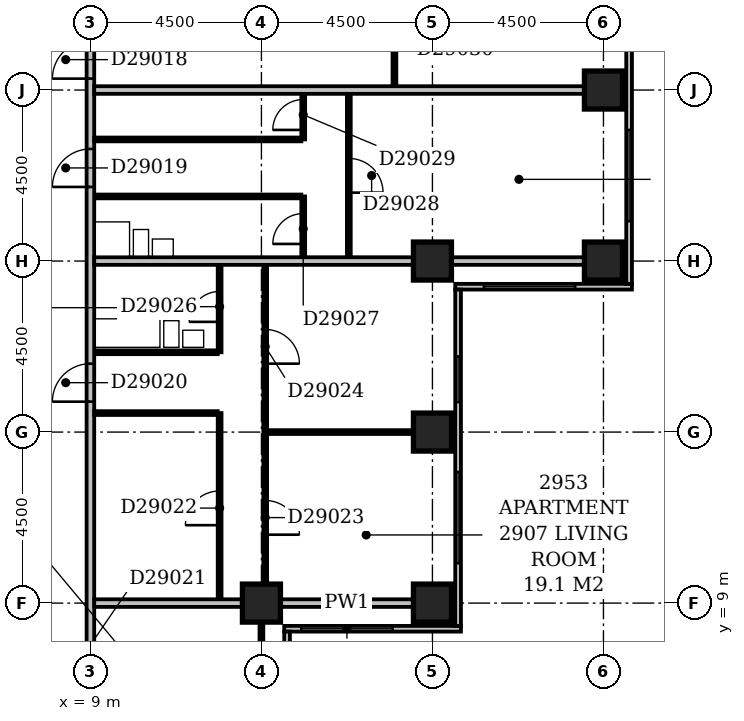
"""IFC4 building model, lengths in metres.
Left out: names, types, materials, properties, quantities, classifications, styles, units other than length and angle.
Written with IfcOpenShell. Run it as: python <this file> out.ifc"""

import sys

from ifc_helpers import new_model, si_unit, direction, frame, frame_2d, origin, origin_2d, place, context, subcontext, project, spatial, rectangle, extrude, element, fill, save


model = new_model("IFC4")
c1 = context("Model", 3, precision=1e-05, world=origin(), true_north=direction((0.0, 1.0)))
c2 = subcontext(c1, "Body", "Model", "MODEL_VIEW")
j1 = project(units=[si_unit("LENGTHUNIT", "METRE"), si_unit("PLANEANGLEUNIT", "RADIAN")], contexts=[c1])
p1 = place(None, origin())
s1 = spatial("IfcSite", under=j1, at=p1, CompositionType="ELEMENT")
p2 = place(p1, origin())
s2 = spatial("IfcBuilding", under=s1, at=p2, CompositionType="ELEMENT")
p3 = place(p2, frame((0.0, 0.0, 119.6)))
s3 = spatial("IfcBuildingStorey", under=s2, at=p3, CompositionType="ELEMENT", Elevation=119.6)
for number, where, z_axis, x_axis in (
    (1, (13.5, 9.0, -0.3), (0.0, 0.0, 1.0), (1.0, 0.0, 0.0)),
    (2, (18.0, 9.0, -0.3), (0.0, 0.0, 1.0), (1.0, 0.0, 0.0)),
    (3, (18.0, 13.5, -0.3), (0.0, 0.0, 1.0), (1.0, 0.0, 0.0)),
    (4, (18.0, 18.0, -0.3), (0.0, 0.0, 1.0), (1.0, 0.0, 0.0)),
    (5, (22.5, 18.0, -0.3), (0.0, 0.0, 1.0), (1.0, 0.0, 0.0)),
    (6, (22.5, 22.5, -0.3), (0.0, 0.0, 1.0), (1.0, 0.0, 0.0)),
):
    element("IfcColumn", number, at=place(p3, frame(where, z_axis=z_axis, x_axis=x_axis)), inside=s3, PredefinedType="COLUMN", context=c2, shape_type="SweptSolid", body=[
        extrude(rectangle(XDim=1.0, YDim=1.0, at=origin_2d()), origin(), (0.0, 0.0, 1.0), 3.6),
    ])
p4 = place(p3, frame((14.175, 3.9, 0.0), z_axis=(0.0, 0.0, 1.0), x_axis=(0.0, 1.0, 0.0)))
e7 = element("IfcWall", 7, at=p4, inside=s3, PredefinedType="STANDARD", context=c2, shape_type="SweptSolid", body=[
    extrude(rectangle(XDim=4.35, YDim=0.15, at=frame_2d((2.175, 0.0))), origin(), (0.0, 0.0, 1.0), 2.7),
])
p5 = place(p4, frame((1.65, 0.0, 0.6)))
e8 = element("IfcOpeningElement", 8, at=p5, cuts=e7, PredefinedType="OPENING", context=c2, shape_type="SweptSolid", body=[
    extrude(rectangle(XDim=2.4, YDim=1.8, at=frame_2d((1.2, 0.9))), frame((0.0, 0.087, 0.0), z_axis=(0.0, -1.0, 0.0), x_axis=(1.0, 0.0, 0.0)), (0.0, 0.0, 1.0), 0.174),
])
p6 = place(p3, frame((14.1, 8.325, 0.0), z_axis=(0.0, 0.0, 1.0), x_axis=(1.0, 0.0, 0.0)))
e9 = element("IfcWall", 9, at=p6, inside=s3, PredefinedType="STANDARD", context=c2, shape_type="SweptSolid", body=[
    extrude(rectangle(XDim=4.65, YDim=0.15, at=frame_2d((2.325, 0.0))), origin(), (0.0, 0.0, 1.0), 2.7),
])
p7 = place(p6, frame((0.45, 0.0, 0.6)))
e10 = element("IfcOpeningElement", 10, at=p7, cuts=e9, PredefinedType="OPENING", context=c2, shape_type="SweptSolid", body=[
    extrude(rectangle(XDim=2.4, YDim=1.8, at=frame_2d((1.2, 0.9))), frame((0.0, 0.087, 0.0), z_axis=(0.0, -1.0, 0.0), x_axis=(1.0, 0.0, 0.0)), (0.0, 0.0, 1.0), 0.174),
])
p8 = place(p3, frame((18.675, 8.4, 0.0), z_axis=(0.0, 0.0, 1.0), x_axis=(0.0, 1.0, 0.0)))
e11 = element("IfcWall", 11, at=p8, inside=s3, PredefinedType="STANDARD", context=c2, shape_type="SweptSolid", body=[
    extrude(rectangle(XDim=8.85, YDim=0.15, at=frame_2d((4.425, 0.0))), origin(), (0.0, 0.0, 1.0), 2.7),
])
p9 = place(p8, frame((1.65, 0.0, 0.6)))
e12 = element("IfcOpeningElement", 12, at=p9, cuts=e11, PredefinedType="OPENING", context=c2, shape_type="SweptSolid", body=[
    extrude(rectangle(XDim=2.4, YDim=1.8, at=frame_2d((1.2, 0.9))), frame((0.0, 0.087, 0.0), z_axis=(0.0, -1.0, 0.0), x_axis=(1.0, 0.0, 0.0)), (0.0, 0.0, 1.0), 0.174),
])
p10 = place(p8, frame((5.889, 0.0, 0.6)))
e13 = element("IfcOpeningElement", 13, at=p10, cuts=e11, PredefinedType="OPENING", context=c2, shape_type="SweptSolid", body=[
    extrude(rectangle(XDim=1.2, YDim=1.8, at=frame_2d((0.6, 0.9))), frame((0.0, 0.087, 0.0), z_axis=(0.0, -1.0, 0.0), x_axis=(1.0, 0.0, 0.0)), (0.0, 0.0, 1.0), 0.174),
])
p11 = place(p3, frame((18.6, 17.325, 0.0), z_axis=(0.0, 0.0, 1.0), x_axis=(1.0, 0.0, 0.0)))
e14 = element("IfcWall", 14, at=p11, inside=s3, PredefinedType="STANDARD", context=c2, shape_type="SweptSolid", body=[
    extrude(rectangle(XDim=4.65, YDim=0.15, at=frame_2d((2.325, 0.0))), origin(), (0.0, 0.0, 1.0), 2.7),
])
p12 = place(p11, frame((0.757, 0.0, 0.6)))
e15 = element("IfcOpeningElement", 15, at=p12, cuts=e14, PredefinedType="OPENING", context=c2, shape_type="SweptSolid", body=[
    extrude(rectangle(XDim=2.4, YDim=1.8, at=frame_2d((1.2, 0.9))), frame((0.0, 0.087, 0.0), z_axis=(0.0, -1.0, 0.0), x_axis=(1.0, 0.0, 0.0)), (0.0, 0.0, 1.0), 0.174),
])
p13 = place(p3, frame((23.175, 17.4, 0.0), z_axis=(0.0, 0.0, 1.0), x_axis=(0.0, 1.0, 0.0)))
e16 = element("IfcWall", 16, at=p13, inside=s3, PredefinedType="STANDARD", context=c2, shape_type="SweptSolid", body=[
    extrude(rectangle(XDim=17.85, YDim=0.15, at=frame_2d((8.925, 0.0))), origin(), (0.0, 0.0, 1.0), 2.7),
])
p14 = place(p13, frame((1.65, 0.0, 0.6)))
e17 = element("IfcOpeningElement", 17, at=p14, cuts=e16, PredefinedType="OPENING", context=c2, shape_type="SweptSolid", body=[
    extrude(rectangle(XDim=2.4, YDim=1.8, at=frame_2d((1.2, 0.9))), frame((0.0, 0.087, 0.0), z_axis=(0.0, -1.0, 0.0), x_axis=(1.0, 0.0, 0.0)), (0.0, 0.0, 1.0), 0.174),
])
p15 = place(p13, frame((6.15, 0.0, 0.6)))
e18 = element("IfcOpeningElement", 18, at=p15, cuts=e16, PredefinedType="OPENING", context=c2, shape_type="SweptSolid", body=[
    extrude(rectangle(XDim=2.4, YDim=1.8, at=frame_2d((1.2, 0.9))), frame((0.0, 0.087, 0.0), z_axis=(0.0, -1.0, 0.0), x_axis=(1.0, 0.0, 0.0)), (0.0, 0.0, 1.0), 0.174),
])
p16 = place(p13, frame((10.65, 0.0, 0.6)))
e19 = element("IfcOpeningElement", 19, at=p16, cuts=e16, PredefinedType="OPENING", context=c2, shape_type="SweptSolid", body=[
    extrude(rectangle(XDim=2.4, YDim=1.8, at=frame_2d((1.2, 0.9))), frame((0.0, 0.087, 0.0), z_axis=(0.0, -1.0, 0.0), x_axis=(1.0, 0.0, 0.0)), (0.0, 0.0, 1.0), 0.174),
])
p17 = place(p13, frame((17.13, 0.0, 0.6)))
e20 = element("IfcOpeningElement", 20, at=p17, cuts=e16, PredefinedType="OPENING", context=c2, shape_type="SweptSolid", body=[
    extrude(rectangle(XDim=0.45, YDim=1.8, at=frame_2d((0.225, 0.9))), frame((0.0, 0.087, 0.0), z_axis=(0.0, -1.0, 0.0), x_axis=(1.0, 0.0, 0.0)), (0.0, 0.0, 1.0), 0.174),
])
p18 = place(p3, frame((9.0, 5.0, 0.0), z_axis=(0.0, 0.0, 1.0), x_axis=(0.0, 1.0, 0.0)))
e21 = element("IfcWall", 21, at=p18, inside=s3, PredefinedType="PARTITIONING", context=c2, shape_type="SweptSolid", body=[
    extrude(rectangle(XDim=27.75, YDim=0.2, at=frame_2d((13.875, 0.0))), origin(), (0.0, 0.0, 1.0), 3.3),
])
p19 = place(p18, frame((17.8, 0.0, 0.0)))
e22 = element("IfcOpeningElement", 22, at=p19, cuts=e21, PredefinedType="OPENING", context=c2, shape_type="SweptSolid", body=[
    extrude(rectangle(XDim=1.0, YDim=2.1, at=frame_2d((0.5, 1.05))), frame((0.0, 0.112, 0.0), z_axis=(0.0, -1.0, 0.0), x_axis=(1.0, 0.0, 0.0)), (0.0, 0.0, 1.0), 0.224),
])
p20 = place(p18, frame((14.95, 0.0, 0.0)))
e23 = element("IfcOpeningElement", 23, at=p20, cuts=e21, PredefinedType="OPENING", context=c2, shape_type="SweptSolid", body=[
    extrude(rectangle(XDim=1.0, YDim=2.1, at=frame_2d((0.5, 1.05))), frame((0.0, 0.112, 0.0), z_axis=(0.0, -1.0, 0.0), x_axis=(1.0, 0.0, 0.0)), (0.0, 0.0, 1.0), 0.224),
])
p21 = place(p18, frame((9.3, 0.0, 0.0)))
e24 = element("IfcOpeningElement", 24, at=p21, cuts=e21, PredefinedType="OPENING", context=c2, shape_type="SweptSolid", body=[
    extrude(rectangle(XDim=1.0, YDim=2.1, at=frame_2d((0.5, 1.05))), frame((0.0, 0.112, 0.0), z_axis=(0.0, -1.0, 0.0), x_axis=(1.0, 0.0, 0.0)), (0.0, 0.0, 1.0), 0.224),
])
p22 = place(p18, frame((1.5, 0.0, 0.0)))
e25 = element("IfcOpeningElement", 25, at=p22, cuts=e21, PredefinedType="OPENING", context=c2, shape_type="SweptSolid", body=[
    extrude(rectangle(XDim=0.9, YDim=2.1, at=frame_2d((0.45, 1.05))), frame((0.0, 0.112, 0.0), z_axis=(0.0, -1.0, 0.0), x_axis=(1.0, 0.0, 0.0)), (0.0, 0.0, 1.0), 0.224),
])
p23 = place(p3, frame((13.5, 5.0, 0.0), z_axis=(0.0, 0.0, 1.0), x_axis=(0.0, 1.0, 0.0)))
e26 = element("IfcWall", 26, at=p23, inside=s3, PredefinedType="PARTITIONING", context=c2, shape_type="SweptSolid", body=[
    extrude(rectangle(XDim=3.5, YDim=0.1, at=frame_2d((1.75, 0.0))), origin(), (0.0, 0.0, 1.0), 2.7),
])
p24 = place(p3, frame((9.1, 9.0, 0.0), z_axis=(0.0, 0.0, 1.0), x_axis=(1.0, 0.0, 0.0)))
e27 = element("IfcWall", 27, at=p24, inside=s3, PredefinedType="PARTITIONING", context=c2, shape_type="SweptSolid", body=[
    extrude(rectangle(XDim=3.9, YDim=0.2, at=frame_2d((1.95, 0.0))), origin(), (0.0, 0.0, 1.0), 3.3),
])
p25 = place(p3, frame((14.0, 9.0, 0.0), z_axis=(0.0, 0.0, 1.0), x_axis=(1.0, 0.0, 0.0)))
e28 = element("IfcWall", 28, at=p25, inside=s3, PredefinedType="PARTITIONING", context=c2, shape_type="SweptSolid", body=[
    extrude(rectangle(XDim=3.5, YDim=0.2, at=frame_2d((1.75, 0.0))), origin(), (0.0, 0.0, 1.0), 2.7),
])
p26 = place(p3, frame((12.4, 9.1, 0.0), z_axis=(0.0, 0.0, 1.0), x_axis=(0.0, 1.0, 0.0)))
e29 = element("IfcWall", 29, at=p26, inside=s3, PredefinedType="PARTITIONING", context=c2, shape_type="SweptSolid", body=[
    extrude(rectangle(XDim=4.9, YDim=0.1, at=frame_2d((2.45, 0.0))), origin(), (0.0, 0.0, 1.0), 3.3),
])
p27 = place(p26, frame((1.95, 0.0, 0.0)))
e30 = element("IfcOpeningElement", 30, at=p27, cuts=e29, PredefinedType="OPENING", context=c2, shape_type="SweptSolid", body=[
    extrude(rectangle(XDim=0.9, YDim=2.1, at=frame_2d((0.45, 1.05))), frame((0.0, 0.062, 0.0), z_axis=(0.0, -1.0, 0.0), x_axis=(1.0, 0.0, 0.0)), (0.0, 0.0, 1.0), 0.124),
])
p28 = place(p3, frame((13.6, 9.5, 0.0), z_axis=(0.0, 0.0, 1.0), x_axis=(0.0, 1.0, 0.0)))
e31 = element("IfcWall", 31, at=p28, inside=s3, PredefinedType="PARTITIONING", context=c2, shape_type="SweptSolid", body=[
    extrude(rectangle(XDim=8.4, YDim=0.1, at=frame_2d((4.2, 0.0))), origin(), (0.0, 0.0, 1.0), 3.3),
])
p29 = place(p28, frame((1.3, 0.0, 0.0)))
e32 = element("IfcOpeningElement", 32, at=p29, cuts=e31, PredefinedType="OPENING", context=c2, shape_type="SweptSolid", body=[
    extrude(rectangle(XDim=0.9, YDim=2.1, at=frame_2d((0.45, 1.05))), frame((0.0, 0.062, 0.0), z_axis=(0.0, -1.0, 0.0), x_axis=(1.0, 0.0, 0.0)), (0.0, 0.0, 1.0), 0.124),
])
p30 = place(p28, frame((5.8, 0.0, 0.0)))
e33 = element("IfcOpeningElement", 33, at=p30, cuts=e31, PredefinedType="OPENING", context=c2, shape_type="SweptSolid", body=[
    extrude(rectangle(XDim=0.9, YDim=2.1, at=frame_2d((0.45, 1.05))), frame((0.0, 0.062, 0.0), z_axis=(0.0, -1.0, 0.0), x_axis=(1.0, 0.0, 0.0)), (0.0, 0.0, 1.0), 0.124),
])
p31 = place(p3, frame((13.65, 13.5, 0.0), z_axis=(0.0, 0.0, 1.0), x_axis=(1.0, 0.0, 0.0)))
e34 = element("IfcWall", 34, at=p31, inside=s3, PredefinedType="PARTITIONING", context=c2, shape_type="SweptSolid", body=[
    extrude(rectangle(XDim=3.85, YDim=0.1, at=frame_2d((1.925, 0.0))), origin(), (0.0, 0.0, 1.0), 3.3),
])
p32 = place(p3, frame((9.1, 14.0, 0.0), z_axis=(0.0, 0.0, 1.0), x_axis=(1.0, 0.0, 0.0)))
e35 = element("IfcWall", 35, at=p32, inside=s3, PredefinedType="PARTITIONING", context=c2, shape_type="SweptSolid", body=[
    extrude(rectangle(XDim=3.25, YDim=0.1, at=frame_2d((1.625, 0.0))), origin(), (0.0, 0.0, 1.0), 3.3),
])
p33 = place(p3, frame((9.1, 15.6, 0.0), z_axis=(0.0, 0.0, 1.0), x_axis=(1.0, 0.0, 0.0)))
e36 = element("IfcWall", 36, at=p33, inside=s3, PredefinedType="PLUMBINGWALL", context=c2, shape_type="SweptSolid", body=[
    extrude(rectangle(XDim=3.25, YDim=0.1, at=frame_2d((1.625, 0.0))), origin(), (0.0, 0.0, 1.0), 3.3),
])
p34 = place(p3, frame((12.4, 15.6, 0.0), z_axis=(0.0, 0.0, 1.0), x_axis=(0.0, 1.0, 0.0)))
e37 = element("IfcWall", 37, at=p34, inside=s3, PredefinedType="PARTITIONING", context=c2, shape_type="SweptSolid", body=[
    extrude(rectangle(XDim=2.3, YDim=0.1, at=frame_2d((1.15, 0.0))), origin(), (0.0, 0.0, 1.0), 3.3),
])
p35 = place(p34, frame((0.8, 0.0, 0.0)))
e38 = element("IfcOpeningElement", 38, at=p35, cuts=e37, PredefinedType="OPENING", context=c2, shape_type="SweptSolid", body=[
    extrude(rectangle(XDim=0.8, YDim=2.1, at=frame_2d((0.4, 1.05))), frame((0.0, 0.062, 0.0), z_axis=(0.0, -1.0, 0.0), x_axis=(1.0, 0.0, 0.0)), (0.0, 0.0, 1.0), 0.124),
])
p36 = place(p3, frame((9.1, 18.0, 0.0), z_axis=(0.0, 0.0, 1.0), x_axis=(1.0, 0.0, 0.0)))
e39 = element("IfcWall", 39, at=p36, inside=s3, PredefinedType="PARTITIONING", context=c2, shape_type="SweptSolid", body=[
    extrude(rectangle(XDim=8.4, YDim=0.2, at=frame_2d((4.2, 0.0))), origin(), (0.0, 0.0, 1.0), 2.6),
])
p37 = place(p3, frame((18.5, 18.0, 0.0), z_axis=(0.0, 0.0, 1.0), x_axis=(1.0, 0.0, 0.0)))
e40 = element("IfcWall", 40, at=p37, inside=s3, PredefinedType="PARTITIONING", context=c2, shape_type="SweptSolid", body=[
    extrude(rectangle(XDim=3.5, YDim=0.2, at=frame_2d((1.75, 0.0))), origin(), (0.0, 0.0, 1.0), 2.7),
])
p38 = place(p3, frame((14.6, 18.1, 0.0), z_axis=(0.0, 0.0, 1.0), x_axis=(0.0, 1.0, 0.0)))
e41 = element("IfcWall", 41, at=p38, inside=s3, PredefinedType="PARTITIONING", context=c2, shape_type="SweptSolid", body=[
    extrude(rectangle(XDim=1.6, YDim=0.1, at=frame_2d((0.8, 0.0))), origin(), (0.0, 0.0, 1.0), 3.3),
])
p39 = place(p38, frame((0.35, 0.0, 0.0)))
e42 = element("IfcOpeningElement", 42, at=p39, cuts=e41, PredefinedType="OPENING", context=c2, shape_type="SweptSolid", body=[
    extrude(rectangle(XDim=0.8, YDim=2.1, at=frame_2d((0.4, 1.05))), frame((0.0, 0.062, 0.0), z_axis=(0.0, -1.0, 0.0), x_axis=(1.0, 0.0, 0.0)), (0.0, 0.0, 1.0), 0.124),
])
p40 = place(p3, frame((15.8, 18.1, 0.0), z_axis=(0.0, 0.0, 1.0), x_axis=(0.0, 1.0, 0.0)))
e43 = element("IfcWall", 43, at=p40, inside=s3, PredefinedType="PARTITIONING", context=c2, shape_type="SweptSolid", body=[
    extrude(rectangle(XDim=4.3, YDim=0.1, at=frame_2d((2.15, 0.0))), origin(), (0.0, 0.0, 1.0), 3.3),
])
p41 = place(p40, frame((1.7, 0.0, 0.0)))
e44 = element("IfcOpeningElement", 44, at=p41, cuts=e43, PredefinedType="OPENING", context=c2, shape_type="SweptSolid", body=[
    extrude(rectangle(XDim=0.9, YDim=2.1, at=frame_2d((0.45, 1.05))), frame((0.0, 0.062, 0.0), z_axis=(0.0, -1.0, 0.0), x_axis=(1.0, 0.0, 0.0)), (0.0, 0.0, 1.0), 0.124),
])
p42 = place(p3, frame((9.1, 19.7, 0.0), z_axis=(0.0, 0.0, 1.0), x_axis=(1.0, 0.0, 0.0)))
e45 = element("IfcWall", 45, at=p42, inside=s3, PredefinedType="PLUMBINGWALL", context=c2, shape_type="SweptSolid", body=[
    extrude(rectangle(XDim=5.45, YDim=0.1, at=frame_2d((2.725, 0.0))), origin(), (0.0, 0.0, 1.0), 3.3),
])
p43 = place(p3, frame((9.1, 21.2, 0.0), z_axis=(0.0, 0.0, 1.0), x_axis=(1.0, 0.0, 0.0)))
e46 = element("IfcWall", 46, at=p43, inside=s3, PredefinedType="PARTITIONING", context=c2, shape_type="SweptSolid", body=[
    extrude(rectangle(XDim=5.45, YDim=0.1, at=frame_2d((2.725, 0.0))), origin(), (0.0, 0.0, 1.0), 3.3),
])
p44 = place(p3, frame((14.6, 21.2, 0.0), z_axis=(0.0, 0.0, 1.0), x_axis=(0.0, 1.0, 0.0)))
e47 = element("IfcWall", 47, at=p44, inside=s3, PredefinedType="PARTITIONING", context=c2, shape_type="SweptSolid", body=[
    extrude(rectangle(XDim=1.2, YDim=0.1, at=frame_2d((0.6, 0.0))), origin(), (0.0, 0.0, 1.0), 3.3),
])
p45 = place(p44, frame((0.25, 0.0, 0.0)))
e48 = element("IfcOpeningElement", 48, at=p45, cuts=e47, PredefinedType="OPENING", context=c2, shape_type="SweptSolid", body=[
    extrude(rectangle(XDim=0.8, YDim=2.1, at=frame_2d((0.4, 1.05))), frame((0.0, 0.062, 0.0), z_axis=(0.0, -1.0, 0.0), x_axis=(1.0, 0.0, 0.0)), (0.0, 0.0, 1.0), 0.124),
])
p46 = place(p3, frame((9.1, 22.5, 0.0), z_axis=(0.0, 0.0, 1.0), x_axis=(1.0, 0.0, 0.0)))
e49 = element("IfcWall", 49, at=p46, inside=s3, PredefinedType="PARTITIONING", context=c2, shape_type="SweptSolid", body=[
    extrude(rectangle(XDim=12.9, YDim=0.2, at=frame_2d((6.45, 0.0))), origin(), (0.0, 0.0, 1.0), 3.3),
])
p47 = place(p3, frame((17.0, 22.6, 0.0), z_axis=(0.0, 0.0, 1.0), x_axis=(0.0, 1.0, 0.0)))
e50 = element("IfcWall", 50, at=p47, inside=s3, PredefinedType="PARTITIONING", context=c2, shape_type="SweptSolid", body=[
    extrude(rectangle(XDim=8.8, YDim=0.1, at=frame_2d((4.4, 0.0))), origin(), (0.0, 0.0, 1.0), 3.3),
])
p48 = place(p47, frame((1.7, 0.0, 0.0)))
e51 = element("IfcOpeningElement", 51, at=p48, cuts=e50, PredefinedType="OPENING", context=c2, shape_type="SweptSolid", body=[
    extrude(rectangle(XDim=0.9, YDim=2.1, at=frame_2d((0.45, 1.05))), frame((0.0, 0.062, 0.0), z_axis=(0.0, -1.0, 0.0), x_axis=(1.0, 0.0, 0.0)), (0.0, 0.0, 1.0), 0.124),
])
p49 = place(p47, frame((6.2, 0.0, 0.0)))
e52 = element("IfcOpeningElement", 52, at=p49, cuts=e50, PredefinedType="OPENING", context=c2, shape_type="SweptSolid", body=[
    extrude(rectangle(XDim=0.9, YDim=2.1, at=frame_2d((0.45, 1.05))), frame((0.0, 0.062, 0.0), z_axis=(0.0, -1.0, 0.0), x_axis=(1.0, 0.0, 0.0)), (0.0, 0.0, 1.0), 0.124),
])
p50 = place(p7, origin())
e53 = element("IfcWindow", 53, at=p50, inside=s3, PartitioningType="SINGLE_PANEL", PredefinedType="WINDOW", context=c2, shape_type="SweptSolid", body=[
    extrude(rectangle(XDim=2.4, YDim=1.8, at=frame_2d((1.2, 0.9))), frame((0.0, 0.03, 0.0), z_axis=(0.0, -1.0, 0.0), x_axis=(1.0, 0.0, 0.0)), (0.0, 0.0, 1.0), 0.06),
])
fill(e10, e53)
p51 = place(p9, origin())
e54 = element("IfcWindow", 54, at=p51, inside=s3, PartitioningType="SINGLE_PANEL", PredefinedType="WINDOW", context=c2, shape_type="SweptSolid", body=[
    extrude(rectangle(XDim=2.4, YDim=1.8, at=frame_2d((1.2, 0.9))), frame((0.0, 0.03, 0.0), z_axis=(0.0, -1.0, 0.0), x_axis=(1.0, 0.0, 0.0)), (0.0, 0.0, 1.0), 0.06),
])
fill(e12, e54)
p52 = place(p10, origin())
e55 = element("IfcWindow", 55, at=p52, inside=s3, PartitioningType="SINGLE_PANEL", PredefinedType="WINDOW", context=c2, shape_type="SweptSolid", body=[
    extrude(rectangle(XDim=1.2, YDim=1.8, at=frame_2d((0.6, 0.9))), frame((0.0, 0.03, 0.0), z_axis=(0.0, -1.0, 0.0), x_axis=(1.0, 0.0, 0.0)), (0.0, 0.0, 1.0), 0.06),
])
fill(e13, e55)
p53 = place(p12, origin())
e56 = element("IfcWindow", 56, at=p53, inside=s3, PartitioningType="SINGLE_PANEL", PredefinedType="WINDOW", context=c2, shape_type="SweptSolid", body=[
    extrude(rectangle(XDim=2.4, YDim=1.8, at=frame_2d((1.2, 0.9))), frame((0.0, 0.03, 0.0), z_axis=(0.0, -1.0, 0.0), x_axis=(1.0, 0.0, 0.0)), (0.0, 0.0, 1.0), 0.06),
])
fill(e15, e56)
p54 = place(p14, origin())
e57 = element("IfcWindow", 57, at=p54, inside=s3, PartitioningType="SINGLE_PANEL", PredefinedType="WINDOW", context=c2, shape_type="SweptSolid", body=[
    extrude(rectangle(XDim=2.4, YDim=1.8, at=frame_2d((1.2, 0.9))), frame((0.0, 0.03, 0.0), z_axis=(0.0, -1.0, 0.0), x_axis=(1.0, 0.0, 0.0)), (0.0, 0.0, 1.0), 0.06),
])
fill(e17, e57)
p55 = place(p19, origin())
e58 = element("IfcDoor", 58, at=p55, inside=s3, OperationType="SINGLE_SWING_LEFT", PredefinedType="DOOR", context=c2, shape_type="SweptSolid", body=[
    extrude(rectangle(XDim=1.0, YDim=2.1, at=frame_2d((0.5, 1.05))), frame((0.0, 0.025, 0.0), z_axis=(0.0, -1.0, 0.0), x_axis=(1.0, 0.0, 0.0)), (0.0, 0.0, 1.0), 0.05),
])
fill(e22, e58)
p56 = place(p20, origin())
e59 = element("IfcDoor", 59, at=p56, inside=s3, OperationType="SINGLE_SWING_LEFT", PredefinedType="DOOR", context=c2, shape_type="SweptSolid", body=[
    extrude(rectangle(XDim=1.0, YDim=2.1, at=frame_2d((0.5, 1.05))), frame((0.0, 0.025, 0.0), z_axis=(0.0, -1.0, 0.0), x_axis=(1.0, 0.0, 0.0)), (0.0, 0.0, 1.0), 0.05),
])
fill(e23, e59)
p57 = place(p21, origin())
e60 = element("IfcDoor", 60, at=p57, inside=s3, OperationType="SINGLE_SWING_LEFT", PredefinedType="DOOR", context=c2, shape_type="SweptSolid", body=[
    extrude(rectangle(XDim=1.0, YDim=2.1, at=frame_2d((0.5, 1.05))), frame((0.0, 0.025, 0.0), z_axis=(0.0, -1.0, 0.0), x_axis=(1.0, 0.0, 0.0)), (0.0, 0.0, 1.0), 0.05),
])
fill(e24, e60)
p58 = place(p27, origin())
e61 = element("IfcDoor", 61, at=p58, inside=s3, OperationType="SINGLE_SWING_LEFT", PredefinedType="DOOR", context=c2, shape_type="SweptSolid", body=[
    extrude(rectangle(XDim=0.9, YDim=2.1, at=frame_2d((0.45, 1.05))), frame((0.0, 0.025, 0.0), z_axis=(0.0, -1.0, 0.0), x_axis=(1.0, 0.0, 0.0)), (0.0, 0.0, 1.0), 0.05),
])
fill(e30, e61)
p59 = place(p29, frame((0.9, 0.0, 0.0), z_axis=(0.0, 0.0, 1.0), x_axis=(-1.0, 0.0, 0.0)))
e62 = element("IfcDoor", 62, at=p59, inside=s3, OperationType="SINGLE_SWING_RIGHT", PredefinedType="DOOR", context=c2, shape_type="SweptSolid", body=[
    extrude(rectangle(XDim=0.9, YDim=2.1, at=frame_2d((0.45, 1.05))), frame((0.0, 0.025, 0.0), z_axis=(0.0, -1.0, 0.0), x_axis=(1.0, 0.0, 0.0)), (0.0, 0.0, 1.0), 0.05),
])
fill(e32, e62)
p60 = place(p30, frame((0.9, 0.0, 0.0), z_axis=(0.0, 0.0, 1.0), x_axis=(-1.0, 0.0, 0.0)))
e63 = element("IfcDoor", 63, at=p60, inside=s3, OperationType="SINGLE_SWING_RIGHT", PredefinedType="DOOR", context=c2, shape_type="SweptSolid", body=[
    extrude(rectangle(XDim=0.9, YDim=2.1, at=frame_2d((0.45, 1.05))), frame((0.0, 0.025, 0.0), z_axis=(0.0, -1.0, 0.0), x_axis=(1.0, 0.0, 0.0)), (0.0, 0.0, 1.0), 0.05),
])
fill(e33, e63)
p61 = place(p35, origin())
e64 = element("IfcDoor", 64, at=p61, inside=s3, OperationType="SINGLE_SWING_LEFT", PredefinedType="DOOR", context=c2, shape_type="SweptSolid", body=[
    extrude(rectangle(XDim=0.8, YDim=2.1, at=frame_2d((0.4, 1.05))), frame((0.0, 0.025, 0.0), z_axis=(0.0, -1.0, 0.0), x_axis=(1.0, 0.0, 0.0)), (0.0, 0.0, 1.0), 0.05),
])
fill(e38, e64)
p62 = place(p39, origin())
e65 = element("IfcDoor", 65, at=p62, inside=s3, OperationType="SINGLE_SWING_LEFT", PredefinedType="DOOR", context=c2, shape_type="SweptSolid", body=[
    extrude(rectangle(XDim=0.8, YDim=2.1, at=frame_2d((0.4, 1.05))), frame((0.0, 0.025, 0.0), z_axis=(0.0, -1.0, 0.0), x_axis=(1.0, 0.0, 0.0)), (0.0, 0.0, 1.0), 0.05),
])
fill(e42, e65)
p63 = place(p41, frame((0.9, 0.0, 0.0), z_axis=(0.0, 0.0, 1.0), x_axis=(-1.0, 0.0, 0.0)))
e66 = element("IfcDoor", 66, at=p63, inside=s3, OperationType="SINGLE_SWING_RIGHT", PredefinedType="DOOR", context=c2, shape_type="SweptSolid", body=[
    extrude(rectangle(XDim=0.9, YDim=2.1, at=frame_2d((0.45, 1.05))), frame((0.0, 0.025, 0.0), z_axis=(0.0, -1.0, 0.0), x_axis=(1.0, 0.0, 0.0)), (0.0, 0.0, 1.0), 0.05),
])
fill(e44, e66)
p64 = place(p45, origin())
e67 = element("IfcDoor", 67, at=p64, inside=s3, OperationType="SINGLE_SWING_LEFT", PredefinedType="DOOR", context=c2, shape_type="SweptSolid", body=[
    extrude(rectangle(XDim=0.8, YDim=2.1, at=frame_2d((0.4, 1.05))), frame((0.0, 0.025, 0.0), z_axis=(0.0, -1.0, 0.0), x_axis=(1.0, 0.0, 0.0)), (0.0, 0.0, 1.0), 0.05),
])
fill(e48, e67)
save(model, sys.argv[1])
